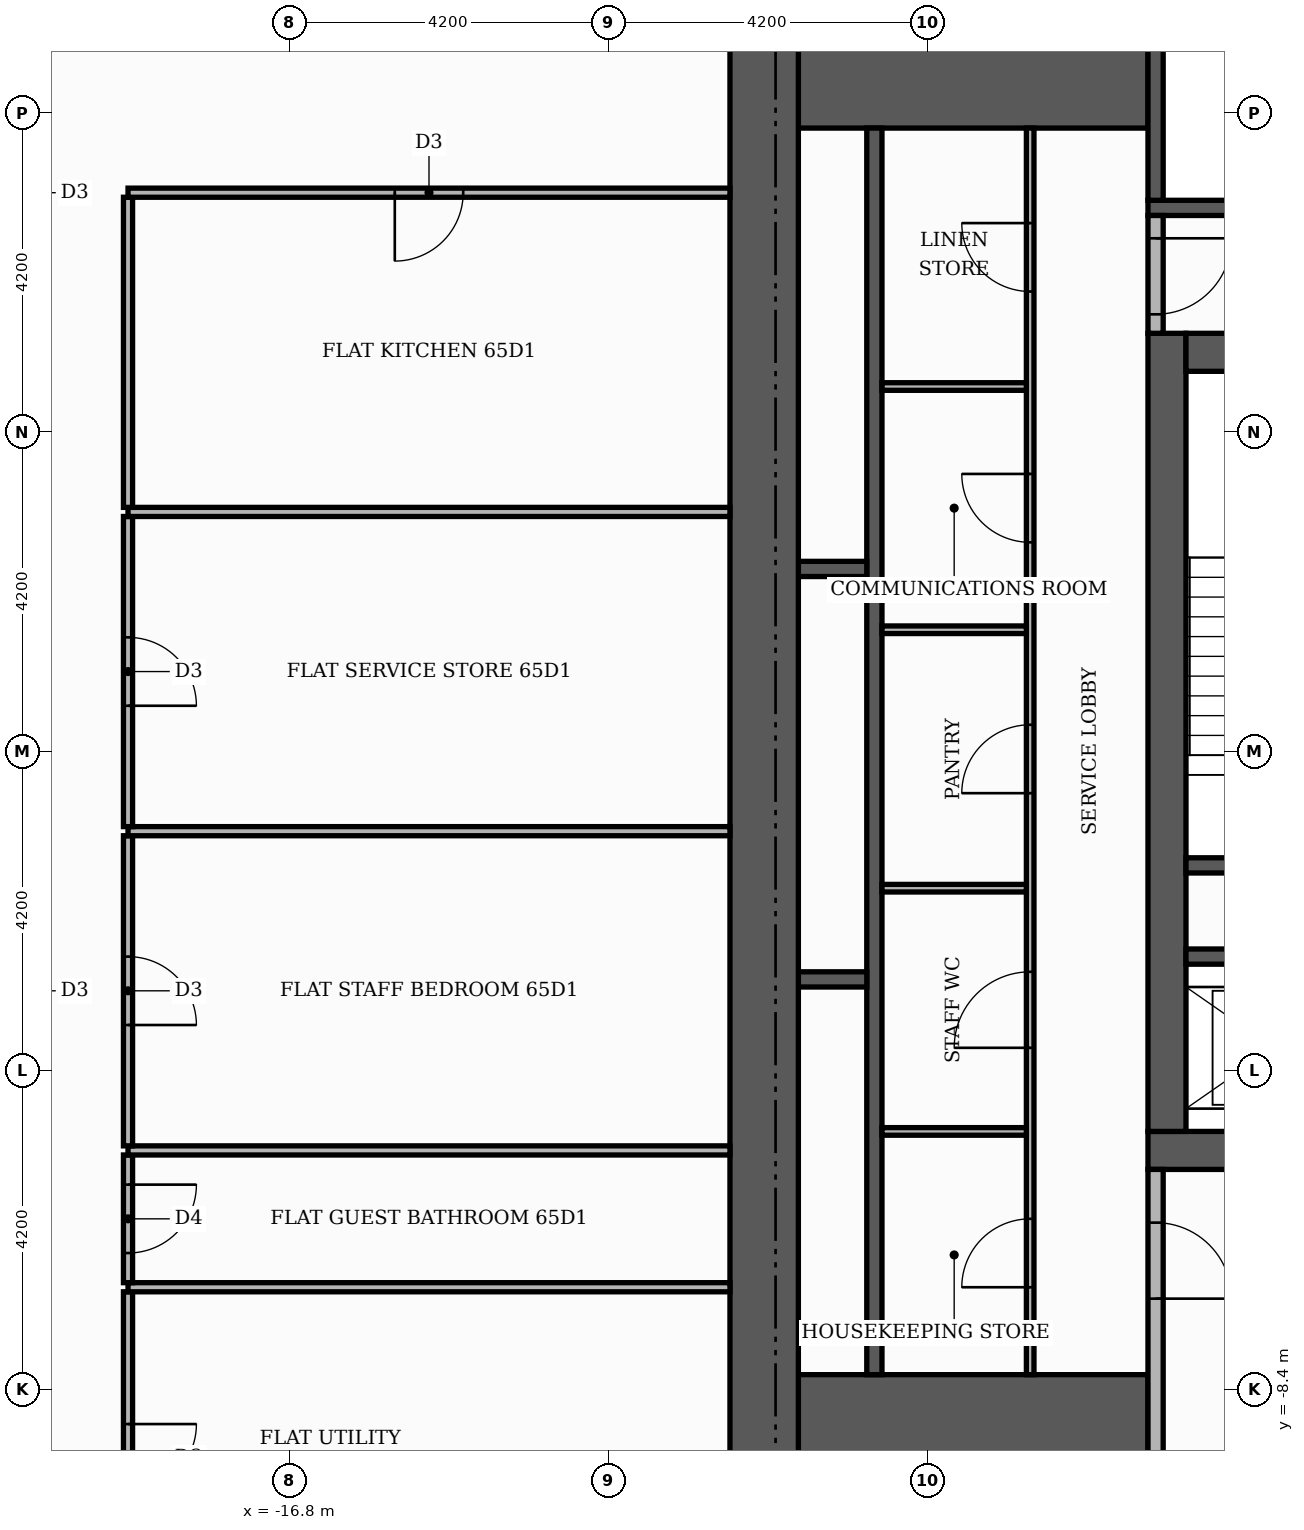
"""IFC4 building model, lengths in metres.
Left out: names, types, materials, properties, quantities, classifications, styles, units other than length and angle.
Written with IfcOpenShell. Run it as: python <this file> out.ifc"""

import sys

from ifc_helpers import new_model, si_unit, direction, frame, frame_2d, origin, place, context, subcontext, project, spatial, rectangle, extrude, element, fill, save


model = new_model("IFC4")
c1 = context("Model", 3, precision=1e-05, world=origin(), true_north=direction((0.0, 1.0)))
c2 = subcontext(c1, "Body", "Model", "MODEL_VIEW")
j1 = project(units=[si_unit("LENGTHUNIT", "METRE"), si_unit("PLANEANGLEUNIT", "RADIAN")], contexts=[c1])
p1 = place(None, origin())
s1 = spatial("IfcSite", under=j1, at=p1, CompositionType="ELEMENT")
p2 = place(p1, origin())
s2 = spatial("IfcBuilding", under=s1, at=p2, CompositionType="ELEMENT")
p3 = place(p2, frame((0.0, 0.0, 271.8)))
s3 = spatial("IfcBuildingStorey", under=s2, at=p3, CompositionType="ELEMENT", Elevation=271.8)
p4 = place(p3, frame((-5.5, -5.25, 0.0), z_axis=(0.0, 0.0, 1.0), x_axis=(1.0, 0.0, 0.0)))
e1 = element("IfcWall", 1, at=p4, inside=s3, PredefinedType="SHEAR", context=c2, shape_type="SweptSolid", body=[
    extrude(rectangle(XDim=11.0, YDim=0.5, at=frame_2d((5.5, 0.0))), origin(), (0.0, 0.0, 1.0), 3.48),
])
p5 = place(p4, frame((4.9, 0.0, 0.0)))
e2 = element("IfcOpeningElement", 2, at=p5, cuts=e1, PredefinedType="OPENING", context=c2, shape_type="SweptSolid", body=[
    extrude(rectangle(XDim=1.2, YDim=2.1, at=frame_2d((0.6, 1.05))), frame((0.0, 0.26, 0.0), z_axis=(0.0, -1.0, 0.0), x_axis=(1.0, 0.0, 0.0)), (0.0, 0.0, 1.0), 0.52),
])
p6 = place(p3, frame((-5.25, -5.0, 0.0), z_axis=(0.0, 0.0, 1.0), x_axis=(0.0, 1.0, 0.0)))
e3 = element("IfcWall", 3, at=p6, inside=s3, PredefinedType="SHEAR", context=c2, shape_type="SweptSolid", body=[
    extrude(rectangle(XDim=10.5, YDim=0.5, at=frame_2d((5.25, 0.0))), origin(), (0.0, 0.0, 1.0), 3.48),
])
p7 = place(p3, frame((-5.0, 5.25, 0.0), z_axis=(0.0, 0.0, 1.0), x_axis=(1.0, 0.0, 0.0)))
e4 = element("IfcWall", 4, at=p7, inside=s3, PredefinedType="SHEAR", context=c2, shape_type="SweptSolid", body=[
    extrude(rectangle(XDim=10.0, YDim=0.5, at=frame_2d((5.0, 0.0))), origin(), (0.0, 0.0, 1.0), 3.48),
])
p8 = place(p7, frame((4.4, 0.0, 0.0)))
e5 = element("IfcOpeningElement", 5, at=p8, cuts=e4, PredefinedType="OPENING", context=c2, shape_type="SweptSolid", body=[
    extrude(rectangle(XDim=1.2, YDim=2.1, at=frame_2d((0.6, 1.05))), frame((0.0, 0.26, 0.0), z_axis=(0.0, -1.0, 0.0), x_axis=(1.0, 0.0, 0.0)), (0.0, 0.0, 1.0), 0.52),
])
for number, where, z_axis, x_axis in (
    (6, (-10.1, -9.15, 0.0), (0.0, 0.0, 1.0), (1.0, 0.0, 0.0)),
    (7, (-10.1, 9.15, 0.0), (0.0, 0.0, 1.0), (1.0, 0.0, 0.0)),
):
    element("IfcWall", number, at=place(p3, frame(where, z_axis=z_axis, x_axis=x_axis)), inside=s3, PredefinedType="SHEAR", context=c2, shape_type="SweptSolid", body=[
        extrude(rectangle(XDim=4.6, YDim=1.9, at=frame_2d((2.3, 0.0))), origin(), (0.0, 0.0, 1.0), 3.48),
    ])
p9 = place(p3, frame((-5.0, -1.5, 0.0), z_axis=(0.0, 0.0, 1.0), x_axis=(1.0, 0.0, 0.0)))
e8 = element("IfcWall", 8, at=p9, inside=s3, PredefinedType="SHEAR", context=c2, shape_type="SweptSolid", body=[
    extrude(rectangle(XDim=3.05, YDim=0.2, at=frame_2d((1.525, 0.0))), origin(), (0.0, 0.0, 1.0), 3.48),
])
p10 = place(p3, frame((-5.5, 7.15, 0.0), z_axis=(0.0, 0.0, 1.0), x_axis=(1.0, 0.0, 0.0)))
e9 = element("IfcWall", 9, at=p10, inside=s3, PredefinedType="SHEAR", context=c2, shape_type="SweptSolid", body=[
    extrude(rectangle(XDim=6.8, YDim=0.2, at=frame_2d((3.4, 0.0))), origin(), (0.0, 0.0, 1.0), 3.48),
])
p11 = place(p3, frame((-5.4, 7.25, 0.0), z_axis=(0.0, 0.0, 1.0), x_axis=(0.0, 1.0, 0.0)))
e10 = element("IfcWall", 10, at=p11, inside=s3, PredefinedType="SHEAR", context=c2, shape_type="SweptSolid", body=[
    extrude(rectangle(XDim=2.85, YDim=0.2, at=frame_2d((1.425, 0.0))), origin(), (0.0, 0.0, 1.0), 3.48),
])
p12 = place(p3, frame((-9.1, -8.2, 0.0), z_axis=(0.0, 0.0, 1.0), x_axis=(0.0, 1.0, 0.0)))
e11 = element("IfcWall", 11, at=p12, inside=s3, PredefinedType="SHEAR", context=c2, shape_type="SweptSolid", body=[
    extrude(rectangle(XDim=16.4, YDim=0.2, at=frame_2d((8.2, 0.0))), origin(), (0.0, 0.0, 1.0), 3.48),
])
p13 = place(p3, frame((-10.1, -3.0, 0.0), z_axis=(0.0, 0.0, 1.0), x_axis=(1.0, 0.0, 0.0)))
e12 = element("IfcWall", 12, at=p13, inside=s3, PredefinedType="SHEAR", context=c2, shape_type="SweptSolid", body=[
    extrude(rectangle(XDim=0.9, YDim=0.2, at=frame_2d((0.45, 0.0))), origin(), (0.0, 0.0, 1.0), 3.48),
])
p14 = place(p3, frame((-5.0, -2.7, 0.0), z_axis=(0.0, 0.0, 1.0), x_axis=(1.0, 0.0, 0.0)))
e13 = element("IfcWall", 13, at=p14, inside=s3, PredefinedType="SHEAR", context=c2, shape_type="SweptSolid", body=[
    extrude(rectangle(XDim=2.85, YDim=0.2, at=frame_2d((1.425, 0.0))), origin(), (0.0, 0.0, 1.0), 3.48),
])
p15 = place(p3, frame((-10.1, 2.4, 0.0), z_axis=(0.0, 0.0, 1.0), x_axis=(1.0, 0.0, 0.0)))
e14 = element("IfcWall", 14, at=p15, inside=s3, PredefinedType="SHEAR", context=c2, shape_type="SweptSolid", body=[
    extrude(rectangle(XDim=0.9, YDim=0.2, at=frame_2d((0.45, 0.0))), origin(), (0.0, 0.0, 1.0), 3.48),
])
p16 = place(p3, frame((-10.55, -10.1, 0.0), z_axis=(0.0, 0.0, 1.0), x_axis=(0.0, 1.0, 0.0)))
e15 = element("IfcWall", 15, at=p16, inside=s3, PredefinedType="SHEAR", context=c2, shape_type="SweptSolid", body=[
    extrude(rectangle(XDim=20.2, YDim=0.9, at=frame_2d((10.1, 0.0))), origin(), (0.0, 0.0, 1.0), 3.48),
])
p17 = place(p3, frame((-5.4, -10.1, 0.0), z_axis=(0.0, 0.0, 1.0), x_axis=(0.0, 1.0, 0.0)))
e16 = element("IfcWall", 16, at=p17, inside=s3, PredefinedType="PARTITIONING", context=c2, shape_type="SweptSolid", body=[
    extrude(rectangle(XDim=4.6, YDim=0.2, at=frame_2d((2.3, 0.0))), origin(), (0.0, 0.0, 1.0), 3.48),
])
p18 = place(p17, frame((2.9, 0.0, 0.0)))
e17 = element("IfcOpeningElement", 17, at=p18, cuts=e16, PredefinedType="OPENING", context=c2, shape_type="SweptSolid", body=[
    extrude(rectangle(XDim=1.0, YDim=2.1, at=frame_2d((0.5, 1.05))), frame((0.0, 0.11, 0.0), z_axis=(0.0, -1.0, 0.0), x_axis=(1.0, 0.0, 0.0)), (0.0, 0.0, 1.0), 0.22),
])
p19 = place(p3, frame((-7.05, -8.2, 0.0), z_axis=(0.0, 0.0, 1.0), x_axis=(0.0, 1.0, 0.0)))
e18 = element("IfcWall", 18, at=p19, inside=s3, PredefinedType="PARTITIONING", context=c2, shape_type="SweptSolid", body=[
    extrude(rectangle(XDim=16.4, YDim=0.1, at=frame_2d((8.2, 0.0))), origin(), (0.0, 0.0, 1.0), 3.48),
])
p20 = place(p19, frame((1.15, 0.0, 0.0)))
e19 = element("IfcOpeningElement", 19, at=p20, cuts=e18, PredefinedType="OPENING", context=c2, shape_type="SweptSolid", body=[
    extrude(rectangle(XDim=0.9, YDim=2.1, at=frame_2d((0.45, 1.05))), frame((0.0, 0.06, 0.0), z_axis=(0.0, -1.0, 0.0), x_axis=(1.0, 0.0, 0.0)), (0.0, 0.0, 1.0), 0.12),
])
p21 = place(p19, frame((4.3, 0.0, 0.0)))
e20 = element("IfcOpeningElement", 20, at=p21, cuts=e18, PredefinedType="OPENING", context=c2, shape_type="SweptSolid", body=[
    extrude(rectangle(XDim=1.0, YDim=2.1, at=frame_2d((0.5, 1.05))), frame((0.0, 0.06, 0.0), z_axis=(0.0, -1.0, 0.0), x_axis=(1.0, 0.0, 0.0)), (0.0, 0.0, 1.0), 0.12),
])
p22 = place(p19, frame((7.65, 0.0, 0.0)))
e21 = element("IfcOpeningElement", 21, at=p22, cuts=e18, PredefinedType="OPENING", context=c2, shape_type="SweptSolid", body=[
    extrude(rectangle(XDim=0.9, YDim=2.1, at=frame_2d((0.45, 1.05))), frame((0.0, 0.06, 0.0), z_axis=(0.0, -1.0, 0.0), x_axis=(1.0, 0.0, 0.0)), (0.0, 0.0, 1.0), 0.12),
])
p23 = place(p19, frame((10.95, 0.0, 0.0)))
e22 = element("IfcOpeningElement", 22, at=p23, cuts=e18, PredefinedType="OPENING", context=c2, shape_type="SweptSolid", body=[
    extrude(rectangle(XDim=0.9, YDim=2.1, at=frame_2d((0.45, 1.05))), frame((0.0, 0.06, 0.0), z_axis=(0.0, -1.0, 0.0), x_axis=(1.0, 0.0, 0.0)), (0.0, 0.0, 1.0), 0.12),
])
p24 = place(p19, frame((14.25, 0.0, 0.0)))
e23 = element("IfcOpeningElement", 23, at=p24, cuts=e18, PredefinedType="OPENING", context=c2, shape_type="SweptSolid", body=[
    extrude(rectangle(XDim=0.9, YDim=2.1, at=frame_2d((0.45, 1.05))), frame((0.0, 0.06, 0.0), z_axis=(0.0, -1.0, 0.0), x_axis=(1.0, 0.0, 0.0)), (0.0, 0.0, 1.0), 0.12),
])
for number, where, z_axis, x_axis in (
    (24, (-9.0, -5.0, 0.0), (0.0, 0.0, 1.0), (1.0, 0.0, 0.0)),
    (25, (-9.0, -1.8, 0.0), (0.0, 0.0, 1.0), (1.0, 0.0, 0.0)),
    (26, (-9.0, 1.6, 0.0), (0.0, 0.0, 1.0), (1.0, 0.0, 0.0)),
    (27, (-9.0, 4.8, 0.0), (0.0, 0.0, 1.0), (1.0, 0.0, 0.0)),
):
    element("IfcWall", number, at=place(p3, frame(where, z_axis=z_axis, x_axis=x_axis)), inside=s3, PredefinedType="PARTITIONING", context=c2, shape_type="SweptSolid", body=[
        extrude(rectangle(XDim=1.9, YDim=0.1, at=frame_2d((0.95, 0.0))), origin(), (0.0, 0.0, 1.0), 3.48),
    ])
p25 = place(p3, frame((-5.4, 5.5, 0.0), z_axis=(0.0, 0.0, 1.0), x_axis=(0.0, 1.0, 0.0)))
e28 = element("IfcWall", 28, at=p25, inside=s3, PredefinedType="PARTITIONING", context=c2, shape_type="SweptSolid", body=[
    extrude(rectangle(XDim=1.55, YDim=0.2, at=frame_2d((0.775, 0.0))), origin(), (0.0, 0.0, 1.0), 3.48),
])
p26 = place(p25, frame((0.25, 0.0, 0.0)))
e29 = element("IfcOpeningElement", 29, at=p26, cuts=e28, PredefinedType="OPENING", context=c2, shape_type="SweptSolid", body=[
    extrude(rectangle(XDim=1.0, YDim=2.1, at=frame_2d((0.5, 1.05))), frame((0.0, 0.11, 0.0), z_axis=(0.0, -1.0, 0.0), x_axis=(1.0, 0.0, 0.0)), (0.0, 0.0, 1.0), 0.22),
])
p27 = place(p3, frame((-18.92, -11.49, 0.0), z_axis=(0.0, 0.0, 1.0), x_axis=(0.0, 1.0, 0.0)))
e30 = element("IfcWall", 30, at=p27, inside=s3, PredefinedType="PARTITIONING", context=c2, shape_type="SweptSolid", body=[
    extrude(rectangle(XDim=4.38, YDim=0.12, at=frame_2d((2.19, 0.0))), origin(), (0.0, 0.0, 1.0), 3.48),
])
p28 = place(p27, frame((1.74, 0.0, 0.0)))
e31 = element("IfcOpeningElement", 31, at=p28, cuts=e30, PredefinedType="OPENING", context=c2, shape_type="SweptSolid", body=[
    extrude(rectangle(XDim=0.9, YDim=2.1, at=frame_2d((0.45, 1.05))), frame((0.0, 0.07, 0.0), z_axis=(0.0, -1.0, 0.0), x_axis=(1.0, 0.0, 0.0)), (0.0, 0.0, 1.0), 0.14),
])
p29 = place(p3, frame((-18.92, -7.05, 0.0), z_axis=(0.0, 0.0, 1.0), x_axis=(1.0, 0.0, 0.0)))
e32 = element("IfcWall", 32, at=p29, inside=s3, PredefinedType="PARTITIONING", context=c2, shape_type="SweptSolid", body=[
    extrude(rectangle(XDim=7.92, YDim=0.12, at=frame_2d((3.96, 0.0))), origin(), (0.0, 0.0, 1.0), 3.48),
])
p30 = place(p3, frame((-18.92, -6.99, 0.0), z_axis=(0.0, 0.0, 1.0), x_axis=(0.0, 1.0, 0.0)))
e33 = element("IfcWall", 33, at=p30, inside=s3, PredefinedType="PARTITIONING", context=c2, shape_type="SweptSolid", body=[
    extrude(rectangle(XDim=1.68, YDim=0.12, at=frame_2d((0.84, 0.0))), origin(), (0.0, 0.0, 1.0), 3.48),
])
p31 = place(p30, frame((0.39, 0.0, 0.0)))
e34 = element("IfcOpeningElement", 34, at=p31, cuts=e33, PredefinedType="OPENING", context=c2, shape_type="SweptSolid", body=[
    extrude(rectangle(XDim=0.9, YDim=2.1, at=frame_2d((0.45, 1.05))), frame((0.0, 0.07, 0.0), z_axis=(0.0, -1.0, 0.0), x_axis=(1.0, 0.0, 0.0)), (0.0, 0.0, 1.0), 0.14),
])
p32 = place(p3, frame((-18.92, -5.25, 0.0), z_axis=(0.0, 0.0, 1.0), x_axis=(1.0, 0.0, 0.0)))
e35 = element("IfcWall", 35, at=p32, inside=s3, PredefinedType="PARTITIONING", context=c2, shape_type="SweptSolid", body=[
    extrude(rectangle(XDim=7.92, YDim=0.12, at=frame_2d((3.96, 0.0))), origin(), (0.0, 0.0, 1.0), 3.48),
])
p33 = place(p3, frame((-18.92, -5.19, 0.0), z_axis=(0.0, 0.0, 1.0), x_axis=(0.0, 1.0, 0.0)))
e36 = element("IfcWall", 36, at=p33, inside=s3, PredefinedType="PARTITIONING", context=c2, shape_type="SweptSolid", body=[
    extrude(rectangle(XDim=4.08, YDim=0.12, at=frame_2d((2.04, 0.0))), origin(), (0.0, 0.0, 1.0), 3.48),
])
p34 = place(p33, frame((1.59, 0.0, 0.0)))
e37 = element("IfcOpeningElement", 37, at=p34, cuts=e36, PredefinedType="OPENING", context=c2, shape_type="SweptSolid", body=[
    extrude(rectangle(XDim=0.9, YDim=2.1, at=frame_2d((0.45, 1.05))), frame((0.0, 0.07, 0.0), z_axis=(0.0, -1.0, 0.0), x_axis=(1.0, 0.0, 0.0)), (0.0, 0.0, 1.0), 0.14),
])
p35 = place(p3, frame((-18.92, -1.05, 0.0), z_axis=(0.0, 0.0, 1.0), x_axis=(1.0, 0.0, 0.0)))
e38 = element("IfcWall", 38, at=p35, inside=s3, PredefinedType="PARTITIONING", context=c2, shape_type="SweptSolid", body=[
    extrude(rectangle(XDim=7.92, YDim=0.12, at=frame_2d((3.96, 0.0))), origin(), (0.0, 0.0, 1.0), 3.48),
])
p36 = place(p3, frame((-18.92, -0.99, 0.0), z_axis=(0.0, 0.0, 1.0), x_axis=(0.0, 1.0, 0.0)))
e39 = element("IfcWall", 39, at=p36, inside=s3, PredefinedType="PARTITIONING", context=c2, shape_type="SweptSolid", body=[
    extrude(rectangle(XDim=4.08, YDim=0.12, at=frame_2d((2.04, 0.0))), origin(), (0.0, 0.0, 1.0), 3.48),
])
p37 = place(p36, frame((1.59, 0.0, 0.0)))
e40 = element("IfcOpeningElement", 40, at=p37, cuts=e39, PredefinedType="OPENING", context=c2, shape_type="SweptSolid", body=[
    extrude(rectangle(XDim=0.9, YDim=2.1, at=frame_2d((0.45, 1.05))), frame((0.0, 0.07, 0.0), z_axis=(0.0, -1.0, 0.0), x_axis=(1.0, 0.0, 0.0)), (0.0, 0.0, 1.0), 0.14),
])
p38 = place(p3, frame((-18.92, 3.15, 0.0), z_axis=(0.0, 0.0, 1.0), x_axis=(1.0, 0.0, 0.0)))
e41 = element("IfcWall", 41, at=p38, inside=s3, PredefinedType="PARTITIONING", context=c2, shape_type="SweptSolid", body=[
    extrude(rectangle(XDim=7.92, YDim=0.12, at=frame_2d((3.96, 0.0))), origin(), (0.0, 0.0, 1.0), 3.48),
])
p39 = place(p3, frame((-18.92, 3.21, 0.0), z_axis=(0.0, 0.0, 1.0), x_axis=(0.0, 1.0, 0.0)))
e42 = element("IfcWall", 42, at=p39, inside=s3, PredefinedType="PARTITIONING", context=c2, shape_type="SweptSolid", body=[
    extrude(rectangle(XDim=4.08, YDim=0.12, at=frame_2d((2.04, 0.0))), origin(), (0.0, 0.0, 1.0), 3.48),
])
p40 = place(p3, frame((-18.92, 7.35, 0.0), z_axis=(0.0, 0.0, 1.0), x_axis=(1.0, 0.0, 0.0)))
e43 = element("IfcWall", 43, at=p40, inside=s3, PredefinedType="PARTITIONING", context=c2, shape_type="SweptSolid", body=[
    extrude(rectangle(XDim=7.92, YDim=0.12, at=frame_2d((3.96, 0.0))), origin(), (0.0, 0.0, 1.0), 3.48),
])
p41 = place(p40, frame((3.51, 0.0, 0.0)))
e44 = element("IfcOpeningElement", 44, at=p41, cuts=e43, PredefinedType="OPENING", context=c2, shape_type="SweptSolid", body=[
    extrude(rectangle(XDim=0.9, YDim=2.1, at=frame_2d((0.45, 1.05))), frame((0.0, 0.07, 0.0), z_axis=(0.0, -1.0, 0.0), x_axis=(1.0, 0.0, 0.0)), (0.0, 0.0, 1.0), 0.14),
])
p42 = place(p26, frame((1.0, 0.0, 0.0), z_axis=(0.0, 0.0, 1.0), x_axis=(-1.0, 0.0, 0.0)))
e45 = element("IfcDoor", 45, at=p42, inside=s3, OperationType="SINGLE_SWING_RIGHT", PredefinedType="DOOR", context=c2, shape_type="SweptSolid", body=[
    extrude(rectangle(XDim=1.0, YDim=2.1, at=frame_2d((0.5, 1.05))), frame((0.0, 0.025, 0.0), z_axis=(0.0, -1.0, 0.0), x_axis=(1.0, 0.0, 0.0)), (0.0, 0.0, 1.0), 0.05),
])
fill(e29, e45)
p43 = place(p18, frame((1.0, 0.0, 0.0), z_axis=(0.0, 0.0, 1.0), x_axis=(-1.0, 0.0, 0.0)))
e46 = element("IfcDoor", 46, at=p43, inside=s3, OperationType="SINGLE_SWING_LEFT", PredefinedType="DOOR", context=c2, shape_type="SweptSolid", body=[
    extrude(rectangle(XDim=1.0, YDim=2.1, at=frame_2d((0.5, 1.05))), frame((0.0, 0.025, 0.0), z_axis=(0.0, -1.0, 0.0), x_axis=(1.0, 0.0, 0.0)), (0.0, 0.0, 1.0), 0.05),
])
fill(e17, e46)
p44 = place(p20, origin())
e47 = element("IfcDoor", 47, at=p44, inside=s3, OperationType="SINGLE_SWING_LEFT", PredefinedType="DOOR", context=c2, shape_type="SweptSolid", body=[
    extrude(rectangle(XDim=0.9, YDim=2.1, at=frame_2d((0.45, 1.05))), frame((0.0, 0.025, 0.0), z_axis=(0.0, -1.0, 0.0), x_axis=(1.0, 0.0, 0.0)), (0.0, 0.0, 1.0), 0.05),
])
fill(e19, e47)
p45 = place(p21, origin())
e48 = element("IfcDoor", 48, at=p45, inside=s3, OperationType="SINGLE_SWING_LEFT", PredefinedType="DOOR", context=c2, shape_type="SweptSolid", body=[
    extrude(rectangle(XDim=1.0, YDim=2.1, at=frame_2d((0.5, 1.05))), frame((0.0, 0.025, 0.0), z_axis=(0.0, -1.0, 0.0), x_axis=(1.0, 0.0, 0.0)), (0.0, 0.0, 1.0), 0.05),
])
fill(e20, e48)
p46 = place(p22, origin())
e49 = element("IfcDoor", 49, at=p46, inside=s3, OperationType="SINGLE_SWING_LEFT", PredefinedType="DOOR", context=c2, shape_type="SweptSolid", body=[
    extrude(rectangle(XDim=0.9, YDim=2.1, at=frame_2d((0.45, 1.05))), frame((0.0, 0.025, 0.0), z_axis=(0.0, -1.0, 0.0), x_axis=(1.0, 0.0, 0.0)), (0.0, 0.0, 1.0), 0.05),
])
fill(e21, e49)
p47 = place(p23, origin())
e50 = element("IfcDoor", 50, at=p47, inside=s3, OperationType="SINGLE_SWING_RIGHT", PredefinedType="DOOR", context=c2, shape_type="SweptSolid", body=[
    extrude(rectangle(XDim=0.9, YDim=2.1, at=frame_2d((0.45, 1.05))), frame((0.0, 0.025, 0.0), z_axis=(0.0, -1.0, 0.0), x_axis=(1.0, 0.0, 0.0)), (0.0, 0.0, 1.0), 0.05),
])
fill(e22, e50)
p48 = place(p24, origin())
e51 = element("IfcDoor", 51, at=p48, inside=s3, OperationType="SINGLE_SWING_RIGHT", PredefinedType="DOOR", context=c2, shape_type="SweptSolid", body=[
    extrude(rectangle(XDim=0.9, YDim=2.1, at=frame_2d((0.45, 1.05))), frame((0.0, 0.025, 0.0), z_axis=(0.0, -1.0, 0.0), x_axis=(1.0, 0.0, 0.0)), (0.0, 0.0, 1.0), 0.05),
])
fill(e23, e51)
p49 = place(p41, frame((0.9, 0.0, 0.0), z_axis=(0.0, 0.0, 1.0), x_axis=(-1.0, 0.0, 0.0)))
e52 = element("IfcDoor", 52, at=p49, inside=s3, OperationType="SINGLE_SWING_LEFT", PredefinedType="DOOR", context=c2, shape_type="SweptSolid", body=[
    extrude(rectangle(XDim=0.9, YDim=2.1, at=frame_2d((0.45, 1.05))), frame((0.0, 0.025, 0.0), z_axis=(0.0, -1.0, 0.0), x_axis=(1.0, 0.0, 0.0)), (0.0, 0.0, 1.0), 0.05),
])
fill(e44, e52)
p50 = place(p37, frame((0.9, 0.0, 0.0), z_axis=(0.0, 0.0, 1.0), x_axis=(-1.0, 0.0, 0.0)))
e53 = element("IfcDoor", 53, at=p50, inside=s3, OperationType="SINGLE_SWING_LEFT", PredefinedType="DOOR", context=c2, shape_type="SweptSolid", body=[
    extrude(rectangle(XDim=0.9, YDim=2.1, at=frame_2d((0.45, 1.05))), frame((0.0, 0.025, 0.0), z_axis=(0.0, -1.0, 0.0), x_axis=(1.0, 0.0, 0.0)), (0.0, 0.0, 1.0), 0.05),
])
fill(e40, e53)
p51 = place(p34, frame((0.9, 0.0, 0.0), z_axis=(0.0, 0.0, 1.0), x_axis=(-1.0, 0.0, 0.0)))
e54 = element("IfcDoor", 54, at=p51, inside=s3, OperationType="SINGLE_SWING_LEFT", PredefinedType="DOOR", context=c2, shape_type="SweptSolid", body=[
    extrude(rectangle(XDim=0.9, YDim=2.1, at=frame_2d((0.45, 1.05))), frame((0.0, 0.025, 0.0), z_axis=(0.0, -1.0, 0.0), x_axis=(1.0, 0.0, 0.0)), (0.0, 0.0, 1.0), 0.05),
])
fill(e37, e54)
p52 = place(p31, frame((0.9, 0.0, 0.0), z_axis=(0.0, 0.0, 1.0), x_axis=(-1.0, 0.0, 0.0)))
e55 = element("IfcDoor", 55, at=p52, inside=s3, OperationType="SINGLE_SWING_RIGHT", PredefinedType="DOOR", context=c2, shape_type="SweptSolid", body=[
    extrude(rectangle(XDim=0.9, YDim=2.1, at=frame_2d((0.45, 1.05))), frame((0.0, 0.025, 0.0), z_axis=(0.0, -1.0, 0.0), x_axis=(1.0, 0.0, 0.0)), (0.0, 0.0, 1.0), 0.05),
])
fill(e34, e55)
p53 = place(p28, frame((0.9, 0.0, 0.0), z_axis=(0.0, 0.0, 1.0), x_axis=(-1.0, 0.0, 0.0)))
e56 = element("IfcDoor", 56, at=p53, inside=s3, OperationType="SINGLE_SWING_RIGHT", PredefinedType="DOOR", context=c2, shape_type="SweptSolid", body=[
    extrude(rectangle(XDim=0.9, YDim=2.1, at=frame_2d((0.45, 1.05))), frame((0.0, 0.025, 0.0), z_axis=(0.0, -1.0, 0.0), x_axis=(1.0, 0.0, 0.0)), (0.0, 0.0, 1.0), 0.05),
])
fill(e31, e56)
save(model, sys.argv[1])
